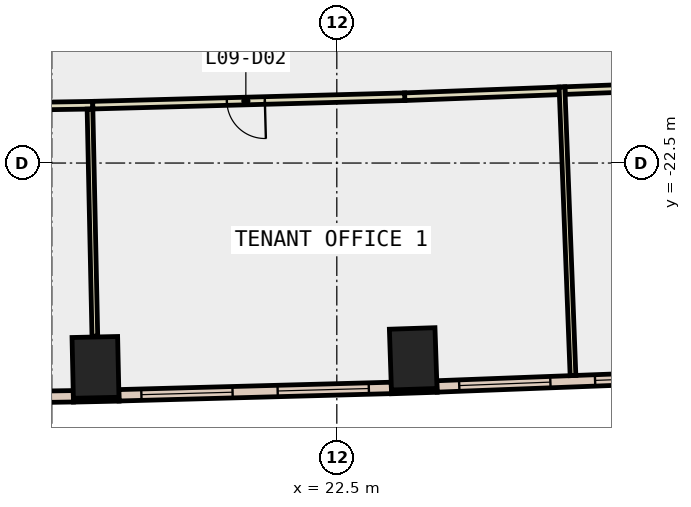
"""IFC4 building model, lengths in metres.
Left out: names, types, materials, properties, quantities, classifications, styles, units other than length and angle.
Written with IfcOpenShell. Run it as: python <this file> out.ifc"""

import sys

from ifc_helpers import new_model, si_unit, direction, frame, frame_2d, origin, origin_2d, place, context, subcontext, project, spatial, rectangle, extrude, element, fill, save


model = new_model("IFC4")
c1 = context("Model", 3, precision=1e-05, world=origin(), true_north=direction((0.0, 1.0)))
c2 = subcontext(c1, "Body", "Model", "MODEL_VIEW")
j1 = project(units=[si_unit("LENGTHUNIT", "METRE"), si_unit("PLANEANGLEUNIT", "RADIAN")], contexts=[c1])
p1 = place(None, origin())
s1 = spatial("IfcSite", under=j1, at=p1, CompositionType="ELEMENT")
p2 = place(p1, origin())
s2 = spatial("IfcBuilding", under=s1, at=p2, CompositionType="ELEMENT")
p3 = place(p2, frame((0.0, 0.0, 47.6)))
s3 = spatial("IfcBuildingStorey", under=s2, at=p3, CompositionType="ELEMENT", Elevation=47.6)
for number, where, z_axis, x_axis in (
    (1, (16.15, -27.877, -0.4), (0.0, 0.0, 1.0), (1.0, 0.022, 0.0)),
    (2, (24.51, -27.652, -0.4), (0.0, 0.0, 1.0), (0.999, 0.034, 0.0)),
):
    element("IfcColumn", number, at=place(p3, frame(where, z_axis=z_axis, x_axis=x_axis)), inside=s3, PredefinedType="COLUMN", context=c2, shape_type="SweptSolid", body=[
        extrude(rectangle(XDim=1.2, YDim=1.6, at=origin_2d()), origin(), (0.0, 0.0, 1.0), 4.2),
    ])
p4 = place(p3, frame((15.569, -28.74, 0.0), z_axis=(0.0, 0.0, 1.0), x_axis=(0.99976752127, 0.021561618973, 0.0)))
e3 = element("IfcWall", 3, at=p4, inside=s3, PredefinedType="STANDARD", context=c2, shape_type="SweptSolid", body=[
    extrude(rectangle(XDim=1.2, YDim=0.1, at=frame_2d((0.6, 0.0))), origin(), (0.0, 0.0, 1.0), 3.8),
])
p5 = place(p3, frame((23.939, -28.521, 0.0), z_axis=(0.0, 0.0, 1.0), x_axis=(0.999442872267, 0.03337581573, 0.0)))
e4 = element("IfcWall", 4, at=p5, inside=s3, PredefinedType="STANDARD", context=c2, shape_type="SweptSolid", body=[
    extrude(rectangle(XDim=1.2, YDim=0.1, at=frame_2d((0.6, 0.0))), origin(), (0.0, 0.0, 1.0), 3.8),
])
p6 = place(p3, frame((8.398, -28.75, 0.0), z_axis=(0.0, 0.0, 1.0), x_axis=(0.999875756772, 0.015762963512, 0.0)))
e5 = element("IfcWall", 5, at=p6, inside=s3, PredefinedType="STANDARD", context=c2, shape_type="SweptSolid", body=[
    extrude(rectangle(XDim=7.171, YDim=0.3, at=frame_2d((3.585, 0.0))), origin(), (0.0, 0.0, 1.0), 3.8),
])
p7 = place(p6, frame((0.593, 0.0, 0.9)))
e6 = element("IfcOpeningElement", 6, at=p7, cuts=e5, PredefinedType="OPENING", context=c2, shape_type="SweptSolid", body=[
    extrude(rectangle(XDim=2.4, YDim=2.6, at=frame_2d((1.2, 1.3))), frame((0.0, 0.16, 0.0), z_axis=(0.0, -1.0, 0.0), x_axis=(1.0, 0.0, 0.0)), (0.0, 0.0, 1.0), 0.32),
])
p8 = place(p6, frame((4.178, 0.0, 0.9)))
e7 = element("IfcOpeningElement", 7, at=p8, cuts=e5, PredefinedType="OPENING", context=c2, shape_type="SweptSolid", body=[
    extrude(rectangle(XDim=2.4, YDim=2.6, at=frame_2d((1.2, 1.3))), frame((0.0, 0.16, 0.0), z_axis=(0.0, -1.0, 0.0), x_axis=(1.0, 0.0, 0.0)), (0.0, 0.0, 1.0), 0.32),
])
p9 = place(p3, frame((16.765, -28.611, 0.0), z_axis=(0.0, 0.0, 1.0), x_axis=(0.999633925798, 0.027055764512, 0.0)))
e8 = element("IfcWall", 8, at=p9, inside=s3, PredefinedType="STANDARD", context=c2, shape_type="SweptSolid", body=[
    extrude(rectangle(XDim=7.174, YDim=0.3, at=frame_2d((3.587, 0.0))), origin(), (0.0, 0.0, 1.0), 3.8),
])
p10 = place(p9, frame((0.593, 0.0, 0.9)))
e9 = element("IfcOpeningElement", 9, at=p10, cuts=e8, PredefinedType="OPENING", context=c2, shape_type="SweptSolid", body=[
    extrude(rectangle(XDim=2.4, YDim=2.6, at=frame_2d((1.2, 1.3))), frame((0.0, 0.16, 0.0), z_axis=(0.0, -1.0, 0.0), x_axis=(1.0, 0.0, 0.0)), (0.0, 0.0, 1.0), 0.32),
])
p11 = place(p9, frame((4.18, 0.0, 0.9)))
e10 = element("IfcOpeningElement", 10, at=p11, cuts=e8, PredefinedType="OPENING", context=c2, shape_type="SweptSolid", body=[
    extrude(rectangle(XDim=2.4, YDim=2.6, at=frame_2d((1.2, 1.3))), frame((0.0, 0.16, 0.0), z_axis=(0.0, -1.0, 0.0), x_axis=(1.0, 0.0, 0.0)), (0.0, 0.0, 1.0), 0.32),
])
p12 = place(p3, frame((25.134, -28.378, 0.0), z_axis=(0.0, 0.0, 1.0), x_axis=(0.999276920032, 0.038021534562, 0.0)))
e11 = element("IfcWall", 11, at=p12, inside=s3, PredefinedType="STANDARD", context=c2, shape_type="SweptSolid", body=[
    extrude(rectangle(XDim=7.153, YDim=0.3, at=frame_2d((3.577, 0.0))), origin(), (0.0, 0.0, 1.0), 3.8),
])
p13 = place(p12, frame((0.588, 0.0, 0.9)))
e12 = element("IfcOpeningElement", 12, at=p13, cuts=e11, PredefinedType="OPENING", context=c2, shape_type="SweptSolid", body=[
    extrude(rectangle(XDim=2.4, YDim=2.6, at=frame_2d((1.2, 1.3))), frame((0.0, 0.16, 0.0), z_axis=(0.0, -1.0, 0.0), x_axis=(1.0, 0.0, 0.0)), (0.0, 0.0, 1.0), 0.32),
])
p14 = place(p12, frame((4.165, 0.0, 0.9)))
e13 = element("IfcOpeningElement", 13, at=p14, cuts=e11, PredefinedType="OPENING", context=c2, shape_type="SweptSolid", body=[
    extrude(rectangle(XDim=2.4, YDim=2.6, at=frame_2d((1.2, 1.3))), frame((0.0, 0.16, 0.0), z_axis=(0.0, -1.0, 0.0), x_axis=(1.0, 0.0, 0.0)), (0.0, 0.0, 1.0), 0.32),
])
p15 = place(p3, frame((16.078, -20.978, 0.0), z_axis=(0.0, 0.0, 1.0), x_axis=(-0.999873907997, -0.015879801838, 0.0)))
e14 = element("IfcWall", 14, at=p15, inside=s3, PredefinedType="PARTITIONING", context=c2, shape_type="SweptSolid", body=[
    extrude(rectangle(XDim=8.379, YDim=0.2, at=frame_2d((4.189, 0.0))), origin(), (0.0, 0.0, 1.0), 3.8),
])
p16 = place(p15, frame((3.689, 0.0, 0.0)))
e15 = element("IfcOpeningElement", 15, at=p16, cuts=e14, PredefinedType="OPENING", context=c2, shape_type="SweptSolid", body=[
    extrude(rectangle(XDim=1.0, YDim=2.1, at=frame_2d((0.5, 1.05))), frame((0.0, 0.11, 0.0), z_axis=(0.0, -1.0, 0.0), x_axis=(1.0, 0.0, 0.0)), (0.0, 0.0, 1.0), 0.22),
])
p17 = place(p3, frame((28.354, -20.6, 0.0), z_axis=(0.0, 0.0, 1.0), x_axis=(-0.999276945714, -0.038020859604, 0.0)))
e16 = element("IfcWall", 16, at=p17, inside=s3, PredefinedType="PARTITIONING", context=c2, shape_type="SweptSolid", body=[
    extrude(rectangle(XDim=4.071, YDim=0.2, at=frame_2d((2.036, 0.0))), origin(), (0.0, 0.0, 1.0), 3.8),
])
p18 = place(p3, frame((24.286, -20.755, 0.0), z_axis=(0.0, 0.0, 1.0), x_axis=(-0.999633883909, -0.027057312146, 0.0)))
e17 = element("IfcWall", 17, at=p18, inside=s3, PredefinedType="PARTITIONING", context=c2, shape_type="SweptSolid", body=[
    extrude(rectangle(XDim=8.211, YDim=0.2, at=frame_2d((4.105, 0.0))), origin(), (0.0, 0.0, 1.0), 3.8),
])
p19 = place(p18, frame((3.681, 0.0, 0.0)))
e18 = element("IfcOpeningElement", 18, at=p19, cuts=e17, PredefinedType="OPENING", context=c2, shape_type="SweptSolid", body=[
    extrude(rectangle(XDim=1.0, YDim=2.1, at=frame_2d((0.5, 1.05))), frame((0.0, 0.11, 0.0), z_axis=(0.0, -1.0, 0.0), x_axis=(1.0, 0.0, 0.0)), (0.0, 0.0, 1.0), 0.22),
])
p20 = place(p3, frame((31.909, -20.464, 0.0), z_axis=(0.0, 0.0, 1.0), x_axis=(-0.999273295147, -0.038116684091, 0.0)))
e19 = element("IfcWall", 19, at=p20, inside=s3, PredefinedType="PARTITIONING", context=c2, shape_type="SweptSolid", body=[
    extrude(rectangle(XDim=3.407, YDim=0.2, at=frame_2d((1.704, 0.0))), origin(), (0.0, 0.0, 1.0), 3.8),
])
p21 = place(p3, frame((16.005, -21.079, 0.0), z_axis=(0.0, 0.0, 1.0), x_axis=(0.021436771826, -0.999770206004, 0.0)))
e20 = element("IfcWall", 20, at=p21, inside=s3, PredefinedType="PARTITIONING", context=c2, shape_type="SweptSolid", body=[
    extrude(rectangle(XDim=5.979, YDim=0.15, at=frame_2d((2.99, 0.0))), origin(), (0.0, 0.0, 1.0), 3.8),
])
p22 = place(p3, frame((28.425, -20.497, 0.0), z_axis=(0.0, 0.0, 1.0), x_axis=(0.03816049016, -0.999271623229, 0.0)))
e21 = element("IfcWall", 21, at=p22, inside=s3, PredefinedType="PARTITIONING", context=c2, shape_type="SweptSolid", body=[
    extrude(rectangle(XDim=7.601, YDim=0.15, at=frame_2d((3.8, 0.0))), origin(), (0.0, 0.0, 1.0), 3.8),
])
p23 = place(p10, origin())
e22 = element("IfcWindow", 22, at=p23, inside=s3, PartitioningType="SINGLE_PANEL", PredefinedType="WINDOW", context=c2, shape_type="SweptSolid", body=[
    extrude(rectangle(XDim=2.4, YDim=2.6, at=frame_2d((1.2, 1.3))), frame((0.0, 0.03, 0.0), z_axis=(0.0, -1.0, 0.0), x_axis=(1.0, 0.0, 0.0)), (0.0, 0.0, 1.0), 0.06),
])
fill(e9, e22)
p24 = place(p11, origin())
e23 = element("IfcWindow", 23, at=p24, inside=s3, PartitioningType="SINGLE_PANEL", PredefinedType="WINDOW", context=c2, shape_type="SweptSolid", body=[
    extrude(rectangle(XDim=2.4, YDim=2.6, at=frame_2d((1.2, 1.3))), frame((0.0, 0.03, 0.0), z_axis=(0.0, -1.0, 0.0), x_axis=(1.0, 0.0, 0.0)), (0.0, 0.0, 1.0), 0.06),
])
fill(e10, e23)
p25 = place(p13, origin())
e24 = element("IfcWindow", 24, at=p25, inside=s3, PartitioningType="SINGLE_PANEL", PredefinedType="WINDOW", context=c2, shape_type="SweptSolid", body=[
    extrude(rectangle(XDim=2.4, YDim=2.6, at=frame_2d((1.2, 1.3))), frame((0.0, 0.03, 0.0), z_axis=(0.0, -1.0, 0.0), x_axis=(1.0, 0.0, 0.0)), (0.0, 0.0, 1.0), 0.06),
])
fill(e12, e24)
p26 = place(p14, origin())
e25 = element("IfcWindow", 25, at=p26, inside=s3, PartitioningType="SINGLE_PANEL", PredefinedType="WINDOW", context=c2, shape_type="SweptSolid", body=[
    extrude(rectangle(XDim=2.4, YDim=2.6, at=frame_2d((1.2, 1.3))), frame((0.0, 0.03, 0.0), z_axis=(0.0, -1.0, 0.0), x_axis=(1.0, 0.0, 0.0)), (0.0, 0.0, 1.0), 0.06),
])
fill(e13, e25)
p27 = place(p19, origin())
e26 = element("IfcDoor", 26, at=p27, inside=s3, OperationType="SINGLE_SWING_RIGHT", PredefinedType="DOOR", context=c2, shape_type="SweptSolid", body=[
    extrude(rectangle(XDim=1.0, YDim=2.1, at=frame_2d((0.5, 1.05))), frame((0.0, 0.025, 0.0), z_axis=(0.0, -1.0, 0.0), x_axis=(1.0, 0.0, 0.0)), (0.0, 0.0, 1.0), 0.05),
])
fill(e18, e26)
save(model, sys.argv[1])
